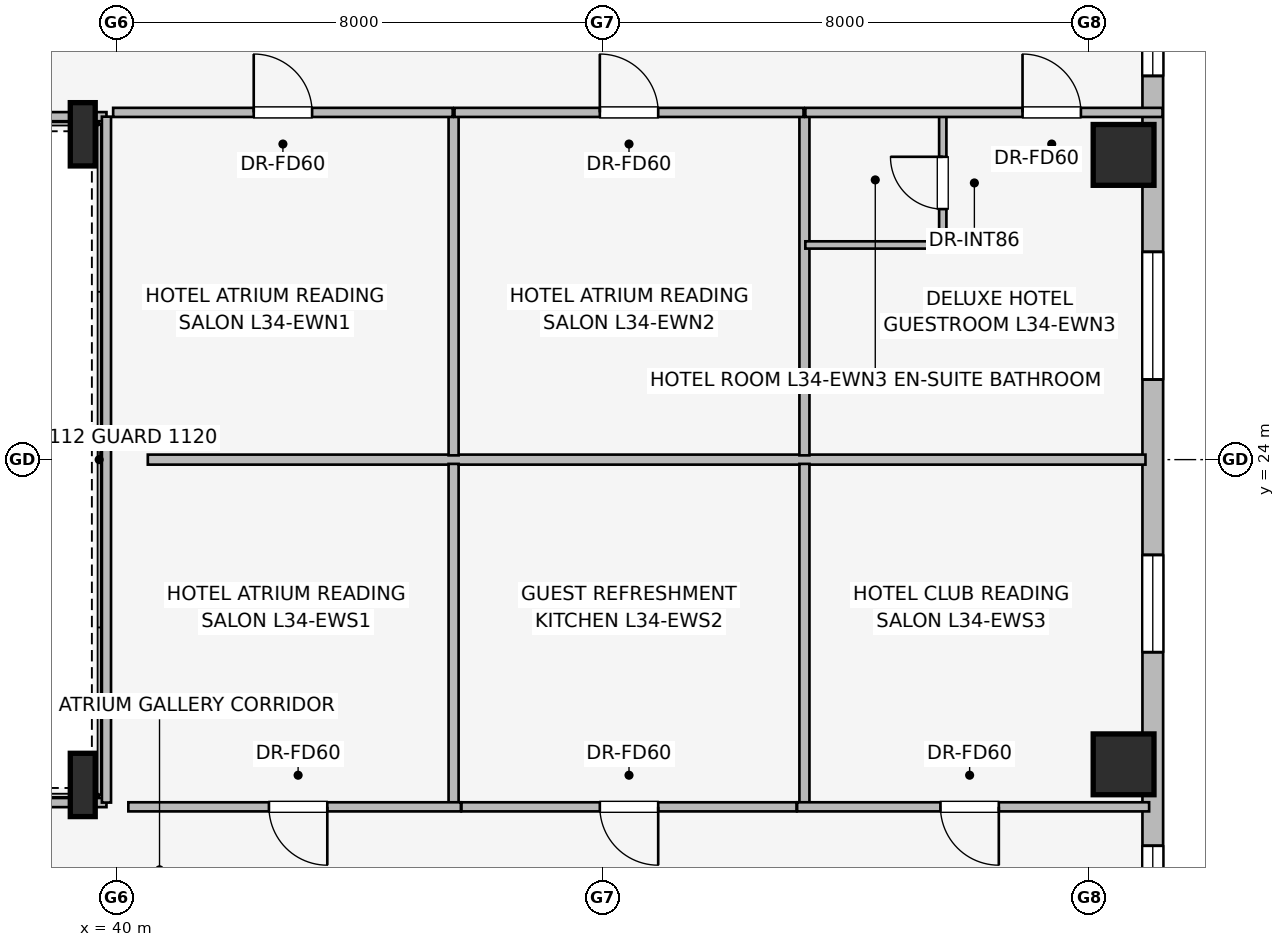
"""IFC4 building model, lengths in metres.
Left out: names, types, materials, properties, quantities, classifications, styles, units other than length and angle.
Written with IfcOpenShell. Run it as: python <this file> out.ifc"""

import sys

from ifc_helpers import new_model, si_unit, direction, frame, frame_2d, origin, origin_2d, place, context, subcontext, project, spatial, rectangle, i_section, extrude, element, fill, save


model = new_model("IFC4")
c1 = context("Model", 3, precision=1e-05, world=origin(), true_north=direction((0.0, 1.0)))
c2 = subcontext(c1, "Body", "Model", "MODEL_VIEW")
j1 = project(units=[si_unit("LENGTHUNIT", "METRE"), si_unit("PLANEANGLEUNIT", "RADIAN")], contexts=[c1])
p1 = place(None, origin())
s1 = spatial("IfcSite", under=j1, at=p1, CompositionType="ELEMENT")
p2 = place(p1, origin())
s2 = spatial("IfcBuilding", under=s1, at=p2, CompositionType="ELEMENT")
p3 = place(p2, frame((0.0, 0.0, 129.15)))
s3 = spatial("IfcBuildingStorey", under=s2, at=p3, CompositionType="ELEMENT", Elevation=129.15)
for number, where, z_axis, x_axis in (
    (1, (56.568, 18.989, 0.0), (0.0, 0.0, 1.0), (1.0, 0.0, 0.0)),
    (2, (56.568, 29.011, 0.0), (0.0, 0.0, 1.0), (1.0, 0.0, 0.0)),
):
    element("IfcColumn", number, at=place(p3, frame(where, z_axis=z_axis, x_axis=x_axis)), inside=s3, PredefinedType="COLUMN", context=c2, shape_type="SweptSolid", body=[
        extrude(rectangle(XDim=1.0, YDim=1.0, at=origin_2d()), origin(), (0.0, 0.0, 1.0), 3.45),
    ])
for number, where, z_axis, x_axis in (
    (3, (39.45, 18.65, 0.0), (0.0, 0.0, 1.0), (1.0, 0.0, 0.0)),
    (4, (39.45, 29.35, 0.0), (0.0, 0.0, 1.0), (1.0, 0.0, 0.0)),
):
    element("IfcColumn", number, at=place(p3, frame(where, z_axis=z_axis, x_axis=x_axis)), inside=s3, PredefinedType="COLUMN", context=c2, shape_type="SweptSolid", body=[
        extrude(i_section(OverallWidth=0.41, OverallDepth=1.041, WebThickness=0.031, FlangeThickness=0.056, at=origin_2d()), origin(), (0.0, 0.0, 1.0), 3.45),
    ])
p4 = place(p3, frame((57.048, 32.352, 0.0), z_axis=(0.0, 0.0, 1.0), x_axis=(0.0, -1.0, 0.0)))
e5 = element("IfcWall", 5, at=p4, inside=s3, PredefinedType="STANDARD", context=c2, shape_type="SweptSolid", body=[
    extrude(rectangle(XDim=16.704, YDim=0.34, at=frame_2d((8.352, 0.0))), origin(), (0.0, 0.0, 1.0), 3.19),
])
p5 = place(p4, frame((0.992, 0.0, 0.75)))
e6 = element("IfcOpeningElement", 6, at=p5, cuts=e5, PredefinedType="OPENING", context=c2, shape_type="SweptSolid", body=[
    extrude(rectangle(XDim=1.05, YDim=1.4, at=frame_2d((0.525, 0.7))), frame((0.0, 0.18, 0.0), z_axis=(0.0, -1.0, 0.0), x_axis=(1.0, 0.0, 0.0)), (0.0, 0.0, 1.0), 0.36),
])
p6 = place(p4, frame((4.935, 0.0, 0.75)))
e7 = element("IfcOpeningElement", 7, at=p6, cuts=e5, PredefinedType="OPENING", context=c2, shape_type="SweptSolid", body=[
    extrude(rectangle(XDim=2.1, YDim=1.5, at=frame_2d((1.05, 0.75))), frame((0.0, 0.18, 0.0), z_axis=(0.0, -1.0, 0.0), x_axis=(1.0, 0.0, 0.0)), (0.0, 0.0, 1.0), 0.36),
])
p7 = place(p4, frame((9.919, 0.0, 0.75)))
e8 = element("IfcOpeningElement", 8, at=p7, cuts=e5, PredefinedType="OPENING", context=c2, shape_type="SweptSolid", body=[
    extrude(rectangle(XDim=1.6, YDim=1.55, at=frame_2d((0.8, 0.775))), frame((0.0, 0.18, 0.0), z_axis=(0.0, -1.0, 0.0), x_axis=(1.0, 0.0, 0.0)), (0.0, 0.0, 1.0), 0.36),
])
p8 = place(p4, frame((14.702, 0.0, 0.75)))
e9 = element("IfcOpeningElement", 9, at=p8, cuts=e5, PredefinedType="OPENING", context=c2, shape_type="SweptSolid", body=[
    extrude(rectangle(XDim=1.05, YDim=1.4, at=frame_2d((0.525, 0.7))), frame((0.0, 0.18, 0.0), z_axis=(0.0, -1.0, 0.0), x_axis=(1.0, 0.0, 0.0)), (0.0, 0.0, 1.0), 0.36),
])
p9 = place(p3, frame((27.55, 18.36, 0.0), z_axis=(0.0, 0.0, 1.0), x_axis=(1.0, 0.0, 0.0)))
e10 = element("IfcWall", 10, at=p9, inside=s3, PredefinedType="PARTITIONING", context=c2, shape_type="SweptSolid", body=[
    extrude(rectangle(XDim=12.29, YDim=0.15, at=frame_2d((6.145, 0.0))), origin(), (0.0, 0.0, 1.0), 2.331),
])
p10 = place(p3, frame((39.84, 29.64, 0.0), z_axis=(0.0, 0.0, 1.0), x_axis=(-1.0, 0.0, 0.0)))
e11 = element("IfcWall", 11, at=p10, inside=s3, PredefinedType="PARTITIONING", context=c2, shape_type="SweptSolid", body=[
    extrude(rectangle(XDim=12.2, YDim=0.15, at=frame_2d((6.1, 0.0))), origin(), (0.0, 0.0, 1.0), 2.331),
])
p11 = place(p3, frame((39.84, 18.36, 0.0), z_axis=(0.0, 0.0, 1.0), x_axis=(0.0, 1.0, 0.0)))
e12 = element("IfcWall", 12, at=p11, inside=s3, PredefinedType="PARTITIONING", context=c2, shape_type="SweptSolid", body=[
    extrude(rectangle(XDim=11.28, YDim=0.15, at=frame_2d((5.64, 0.0))), origin(), (0.0, 0.0, 1.0), 3.19),
])
p12 = place(p3, frame((40.52, 24.0, 0.0), z_axis=(0.0, 0.0, 1.0), x_axis=(1.0, 0.0, 0.0)))
e13 = element("IfcWall", 13, at=p12, inside=s3, PredefinedType="PARTITIONING", context=c2, shape_type="SweptSolid", body=[
    extrude(rectangle(XDim=16.408, YDim=0.165, at=frame_2d((8.204, 0.0))), origin(), (0.0, 0.0, 1.0), 3.19),
])
for number, where, z_axis, x_axis in (
    (14, (45.549, 24.07, 0.0), (0.0, 0.0, 1.0), (0.0, 1.0, 0.0)),
    (15, (51.319, 24.07, 0.0), (0.0, 0.0, 1.0), (0.0, 1.0, 0.0)),
):
    element("IfcWall", number, at=place(p3, frame(where, z_axis=z_axis, x_axis=x_axis)), inside=s3, PredefinedType="PARTITIONING", context=c2, shape_type="SweptSolid", body=[
        extrude(rectangle(XDim=5.64, YDim=0.165, at=frame_2d((2.82, 0.0))), origin(), (0.0, 0.0, 1.0), 3.19),
    ])
p13 = place(p3, frame((39.95, 29.71, 0.0), z_axis=(0.0, 0.0, 1.0), x_axis=(1.0, 0.0, 0.0)))
e16 = element("IfcWall", 16, at=p13, inside=s3, PredefinedType="PARTITIONING", context=c2, shape_type="SweptSolid", body=[
    extrude(rectangle(XDim=5.584, YDim=0.15, at=frame_2d((2.792, 0.0))), origin(), (0.0, 0.0, 1.0), 3.19),
])
p14 = place(p13, frame((2.312, 0.0, 0.0)))
e17 = element("IfcOpeningElement", 17, at=p14, cuts=e16, PredefinedType="OPENING", context=c2, shape_type="SweptSolid", body=[
    extrude(rectangle(XDim=0.96, YDim=2.0, at=frame_2d((0.48, 1.0))), frame((0.0, 0.085, 0.0), z_axis=(0.0, -1.0, 0.0), x_axis=(1.0, 0.0, 0.0)), (0.0, 0.0, 1.0), 0.17),
])
p15 = place(p3, frame((45.564, 29.71, 0.0), z_axis=(0.0, 0.0, 1.0), x_axis=(1.0, 0.0, 0.0)))
e18 = element("IfcWall", 18, at=p15, inside=s3, PredefinedType="PARTITIONING", context=c2, shape_type="SweptSolid", body=[
    extrude(rectangle(XDim=5.74, YDim=0.15, at=frame_2d((2.87, 0.0))), origin(), (0.0, 0.0, 1.0), 3.19),
])
p16 = place(p15, frame((2.39, 0.0, 0.0)))
e19 = element("IfcOpeningElement", 19, at=p16, cuts=e18, PredefinedType="OPENING", context=c2, shape_type="SweptSolid", body=[
    extrude(rectangle(XDim=0.96, YDim=2.0, at=frame_2d((0.48, 1.0))), frame((0.0, 0.085, 0.0), z_axis=(0.0, -1.0, 0.0), x_axis=(1.0, 0.0, 0.0)), (0.0, 0.0, 1.0), 0.17),
])
p17 = place(p3, frame((53.594, 27.47, 0.0), z_axis=(0.0, 0.0, 1.0), x_axis=(0.0, 1.0, 0.0)))
e20 = element("IfcWall", 20, at=p17, inside=s3, PredefinedType="PARTITIONING", context=c2, shape_type="SweptSolid", body=[
    extrude(rectangle(XDim=2.24, YDim=0.12, at=frame_2d((1.12, 0.0))), origin(), (0.0, 0.0, 1.0), 3.19),
])
p18 = place(p17, frame((0.65, 0.0, 0.0)))
e21 = element("IfcOpeningElement", 21, at=p18, cuts=e20, PredefinedType="OPENING", context=c2, shape_type="SweptSolid", body=[
    extrude(rectangle(XDim=0.86, YDim=2.0, at=frame_2d((0.43, 1.0))), frame((0.0, 0.07, 0.0), z_axis=(0.0, -1.0, 0.0), x_axis=(1.0, 0.0, 0.0)), (0.0, 0.0, 1.0), 0.14),
])
p19 = place(p3, frame((51.334, 27.53, 0.0), z_axis=(0.0, 0.0, 1.0), x_axis=(1.0, 0.0, 0.0)))
e22 = element("IfcWall", 22, at=p19, inside=s3, PredefinedType="PARTITIONING", context=c2, shape_type="SweptSolid", body=[
    extrude(rectangle(XDim=2.32, YDim=0.12, at=frame_2d((1.16, 0.0))), origin(), (0.0, 0.0, 1.0), 3.19),
])
p20 = place(p3, frame((51.334, 29.71, 0.0), z_axis=(0.0, 0.0, 1.0), x_axis=(1.0, 0.0, 0.0)))
e23 = element("IfcWall", 23, at=p20, inside=s3, PredefinedType="PARTITIONING", context=c2, shape_type="SweptSolid", body=[
    extrude(rectangle(XDim=5.874, YDim=0.15, at=frame_2d((2.937, 0.0))), origin(), (0.0, 0.0, 1.0), 3.19),
])
p21 = place(p20, frame((3.572, 0.0, 0.0)))
e24 = element("IfcOpeningElement", 24, at=p21, cuts=e23, PredefinedType="OPENING", context=c2, shape_type="SweptSolid", body=[
    extrude(rectangle(XDim=0.96, YDim=2.0, at=frame_2d((0.48, 1.0))), frame((0.0, 0.085, 0.0), z_axis=(0.0, -1.0, 0.0), x_axis=(1.0, 0.0, 0.0)), (0.0, 0.0, 1.0), 0.17),
])
for number, where, z_axis, x_axis in (
    (25, (45.549, 18.29, 0.0), (0.0, 0.0, 1.0), (0.0, 1.0, 0.0)),
    (26, (51.319, 18.29, 0.0), (0.0, 0.0, 1.0), (0.0, 1.0, 0.0)),
):
    element("IfcWall", number, at=place(p3, frame(where, z_axis=z_axis, x_axis=x_axis)), inside=s3, PredefinedType="PARTITIONING", context=c2, shape_type="SweptSolid", body=[
        extrude(rectangle(XDim=5.64, YDim=0.165, at=frame_2d((2.82, 0.0))), origin(), (0.0, 0.0, 1.0), 3.19),
    ])
p22 = place(p3, frame((45.669, 18.29, 0.0), z_axis=(0.0, 0.0, 1.0), x_axis=(-1.0, 0.0, 0.0)))
e27 = element("IfcWall", 27, at=p22, inside=s3, PredefinedType="PARTITIONING", context=c2, shape_type="SweptSolid", body=[
    extrude(rectangle(XDim=5.469, YDim=0.15, at=frame_2d((2.734, 0.0))), origin(), (0.0, 0.0, 1.0), 3.19),
])
p23 = place(p22, frame((2.197, 0.0, 0.0)))
e28 = element("IfcOpeningElement", 28, at=p23, cuts=e27, PredefinedType="OPENING", context=c2, shape_type="SweptSolid", body=[
    extrude(rectangle(XDim=0.96, YDim=2.0, at=frame_2d((0.48, 1.0))), frame((0.0, 0.085, 0.0), z_axis=(0.0, -1.0, 0.0), x_axis=(1.0, 0.0, 0.0)), (0.0, 0.0, 1.0), 0.17),
])
p24 = place(p3, frame((51.189, 18.29, 0.0), z_axis=(0.0, 0.0, 1.0), x_axis=(-1.0, 0.0, 0.0)))
e29 = element("IfcWall", 29, at=p24, inside=s3, PredefinedType="PARTITIONING", context=c2, shape_type="SweptSolid", body=[
    extrude(rectangle(XDim=5.51, YDim=0.15, at=frame_2d((2.755, 0.0))), origin(), (0.0, 0.0, 1.0), 3.19),
])
p25 = place(p24, frame((2.275, 0.0, 0.0)))
e30 = element("IfcOpeningElement", 30, at=p25, cuts=e29, PredefinedType="OPENING", context=c2, shape_type="SweptSolid", body=[
    extrude(rectangle(XDim=0.96, YDim=2.0, at=frame_2d((0.48, 1.0))), frame((0.0, 0.085, 0.0), z_axis=(0.0, -1.0, 0.0), x_axis=(1.0, 0.0, 0.0)), (0.0, 0.0, 1.0), 0.17),
])
p26 = place(p3, frame((56.988, 18.29, 0.0), z_axis=(0.0, 0.0, 1.0), x_axis=(-1.0, 0.0, 0.0)))
e31 = element("IfcWall", 31, at=p26, inside=s3, PredefinedType="PARTITIONING", context=c2, shape_type="SweptSolid", body=[
    extrude(rectangle(XDim=5.789, YDim=0.15, at=frame_2d((2.895, 0.0))), origin(), (0.0, 0.0, 1.0), 3.19),
])
p27 = place(p26, frame((2.472, 0.0, 0.0)))
e32 = element("IfcOpeningElement", 32, at=p27, cuts=e31, PredefinedType="OPENING", context=c2, shape_type="SweptSolid", body=[
    extrude(rectangle(XDim=0.96, YDim=2.0, at=frame_2d((0.48, 1.0))), frame((0.0, 0.085, 0.0), z_axis=(0.0, -1.0, 0.0), x_axis=(1.0, 0.0, 0.0)), (0.0, 0.0, 1.0), 0.17),
])
p28 = place(p5, origin())
e33 = element("IfcWindow", 33, at=p28, inside=s3, PartitioningType="SINGLE_PANEL", PredefinedType="WINDOW", context=c2, shape_type="SweptSolid", body=[
    extrude(rectangle(XDim=1.05, YDim=1.4, at=frame_2d((0.525, 0.7))), frame((0.0, 0.03, 0.0), z_axis=(0.0, -1.0, 0.0), x_axis=(1.0, 0.0, 0.0)), (0.0, 0.0, 1.0), 0.06),
])
fill(e6, e33)
p29 = place(p6, origin())
e34 = element("IfcWindow", 34, at=p29, inside=s3, PartitioningType="SINGLE_PANEL", PredefinedType="WINDOW", context=c2, shape_type="SweptSolid", body=[
    extrude(rectangle(XDim=2.1, YDim=1.5, at=frame_2d((1.05, 0.75))), frame((0.0, 0.03, 0.0), z_axis=(0.0, -1.0, 0.0), x_axis=(1.0, 0.0, 0.0)), (0.0, 0.0, 1.0), 0.06),
])
fill(e7, e34)
p30 = place(p7, origin())
e35 = element("IfcWindow", 35, at=p30, inside=s3, PartitioningType="SINGLE_PANEL", PredefinedType="WINDOW", context=c2, shape_type="SweptSolid", body=[
    extrude(rectangle(XDim=1.6, YDim=1.55, at=frame_2d((0.8, 0.775))), frame((0.0, 0.03, 0.0), z_axis=(0.0, -1.0, 0.0), x_axis=(1.0, 0.0, 0.0)), (0.0, 0.0, 1.0), 0.06),
])
fill(e8, e35)
p31 = place(p8, origin())
e36 = element("IfcWindow", 36, at=p31, inside=s3, PartitioningType="SINGLE_PANEL", PredefinedType="WINDOW", context=c2, shape_type="SweptSolid", body=[
    extrude(rectangle(XDim=1.05, YDim=1.4, at=frame_2d((0.525, 0.7))), frame((0.0, 0.03, 0.0), z_axis=(0.0, -1.0, 0.0), x_axis=(1.0, 0.0, 0.0)), (0.0, 0.0, 1.0), 0.06),
])
fill(e9, e36)
p32 = place(p14, origin())
e37 = element("IfcDoor", 37, at=p32, inside=s3, OperationType="SINGLE_SWING_LEFT", PredefinedType="DOOR", context=c2, shape_type="SweptSolid", body=[
    extrude(rectangle(XDim=0.96, YDim=2.0, at=frame_2d((0.48, 1.0))), frame((0.0, 0.025, 0.0), z_axis=(0.0, -1.0, 0.0), x_axis=(1.0, 0.0, 0.0)), (0.0, 0.0, 1.0), 0.05),
])
fill(e17, e37)
p33 = place(p16, origin())
e38 = element("IfcDoor", 38, at=p33, inside=s3, OperationType="SINGLE_SWING_LEFT", PredefinedType="DOOR", context=c2, shape_type="SweptSolid", body=[
    extrude(rectangle(XDim=0.96, YDim=2.0, at=frame_2d((0.48, 1.0))), frame((0.0, 0.025, 0.0), z_axis=(0.0, -1.0, 0.0), x_axis=(1.0, 0.0, 0.0)), (0.0, 0.0, 1.0), 0.05),
])
fill(e19, e38)
p34 = place(p18, origin())
e39 = element("IfcDoor", 39, at=p34, inside=s3, OperationType="SINGLE_SWING_RIGHT", PredefinedType="DOOR", context=c2, shape_type="SweptSolid", body=[
    extrude(rectangle(XDim=0.86, YDim=2.0, at=frame_2d((0.43, 1.0))), frame((0.0, 0.025, 0.0), z_axis=(0.0, -1.0, 0.0), x_axis=(1.0, 0.0, 0.0)), (0.0, 0.0, 1.0), 0.05),
])
fill(e21, e39)
p35 = place(p21, origin())
e40 = element("IfcDoor", 40, at=p35, inside=s3, OperationType="SINGLE_SWING_LEFT", PredefinedType="DOOR", context=c2, shape_type="SweptSolid", body=[
    extrude(rectangle(XDim=0.96, YDim=2.0, at=frame_2d((0.48, 1.0))), frame((0.0, 0.025, 0.0), z_axis=(0.0, -1.0, 0.0), x_axis=(1.0, 0.0, 0.0)), (0.0, 0.0, 1.0), 0.05),
])
fill(e24, e40)
p36 = place(p23, origin())
e41 = element("IfcDoor", 41, at=p36, inside=s3, OperationType="SINGLE_SWING_LEFT", PredefinedType="DOOR", context=c2, shape_type="SweptSolid", body=[
    extrude(rectangle(XDim=0.96, YDim=2.0, at=frame_2d((0.48, 1.0))), frame((0.0, 0.025, 0.0), z_axis=(0.0, -1.0, 0.0), x_axis=(1.0, 0.0, 0.0)), (0.0, 0.0, 1.0), 0.05),
])
fill(e28, e41)
p37 = place(p25, origin())
e42 = element("IfcDoor", 42, at=p37, inside=s3, OperationType="SINGLE_SWING_LEFT", PredefinedType="DOOR", context=c2, shape_type="SweptSolid", body=[
    extrude(rectangle(XDim=0.96, YDim=2.0, at=frame_2d((0.48, 1.0))), frame((0.0, 0.025, 0.0), z_axis=(0.0, -1.0, 0.0), x_axis=(1.0, 0.0, 0.0)), (0.0, 0.0, 1.0), 0.05),
])
fill(e30, e42)
p38 = place(p27, origin())
e43 = element("IfcDoor", 43, at=p38, inside=s3, OperationType="SINGLE_SWING_LEFT", PredefinedType="DOOR", context=c2, shape_type="SweptSolid", body=[
    extrude(rectangle(XDim=0.96, YDim=2.0, at=frame_2d((0.48, 1.0))), frame((0.0, 0.025, 0.0), z_axis=(0.0, -1.0, 0.0), x_axis=(1.0, 0.0, 0.0)), (0.0, 0.0, 1.0), 0.05),
])
fill(e32, e43)
save(model, sys.argv[1])
